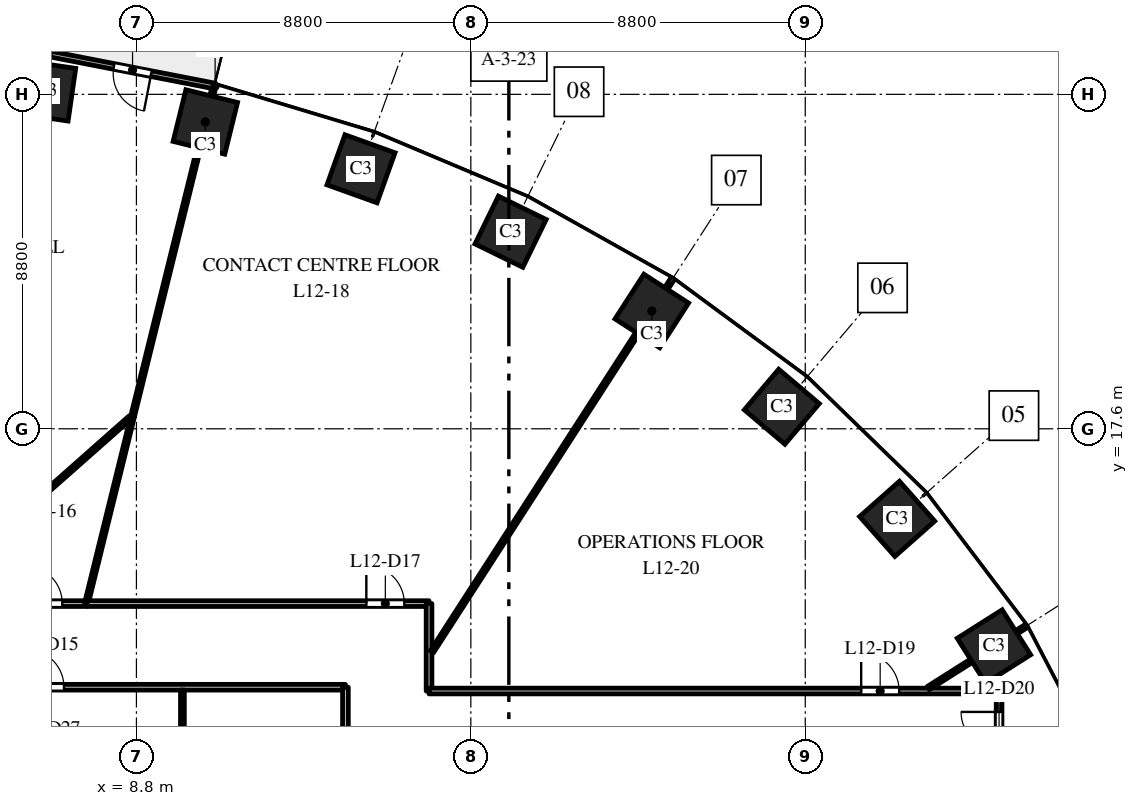
"""IFC4 building model, lengths in metres.
Left out: names, types, materials, properties, quantities, classifications, styles, units other than length and angle.
Written with IfcOpenShell. Run it as: python <this file> out.ifc"""

import sys

from ifc_helpers import new_model, si_unit, direction, frame, frame_2d, origin, origin_2d, place, context, subcontext, project, spatial, rectangle, extrude, element, fill, save


model = new_model("IFC4")
c1 = context("Model", 3, precision=1e-05, world=origin(), true_north=direction((0.0, 1.0)))
c2 = subcontext(c1, "Body", "Model", "MODEL_VIEW")
j1 = project(units=[si_unit("LENGTHUNIT", "METRE"), si_unit("PLANEANGLEUNIT", "RADIAN")], contexts=[c1])
p1 = place(None, origin())
s1 = spatial("IfcSite", under=j1, at=p1, CompositionType="ELEMENT")
p2 = place(p1, origin())
s2 = spatial("IfcBuilding", under=s1, at=p2, CompositionType="ELEMENT")
p3 = place(p2, frame((0.0, 0.0, 58.5)))
s3 = spatial("IfcBuildingStorey", under=s2, at=p3, CompositionType="ELEMENT", Elevation=58.5)
for number, where, z_axis, x_axis in (
    (1, (31.365, 11.871, 0.0), (0.0, 0.0, 1.0), (-0.535, 0.845, 0.0)),
    (2, (28.819, 15.23, 0.0), (0.0, 0.0, 1.0), (-0.663, 0.749, 0.0)),
    (3, (25.783, 18.18, 0.0), (0.0, 0.0, 1.0), (-0.763, 0.646, 0.0)),
    (4, (22.362, 20.7, 0.0), (0.0, 0.0, 1.0), (-0.84, 0.542, 0.0)),
    (5, (18.646, 22.785, 0.0), (0.0, 0.0, 1.0), (-0.898, 0.439, 0.0)),
    (6, (14.709, 24.441, 0.0), (0.0, 0.0, 1.0), (-0.941, 0.338, 0.0)),
    (7, (10.613, 25.674, 0.0), (0.0, 0.0, 1.0), (-0.971, 0.24, 0.0)),
    (8, (6.409, 26.491, 0.0), (0.0, 0.0, 1.0), (-0.99, 0.143, 0.0)),
):
    element("IfcColumn", number, at=place(p3, frame(where, z_axis=z_axis, x_axis=x_axis)), inside=s3, PredefinedType="COLUMN", context=c2, shape_type="SweptSolid", body=[
        extrude(rectangle(XDim=1.4, YDim=1.4, at=origin_2d()), origin(), (0.0, 0.0, 1.0), 4.0),
    ])
p4 = place(p3, frame((10.871, 26.617, 0.0), z_axis=(0.0, 0.0, 1.0), x_axis=(-0.981631174778, 0.190788460615, 0.0)))
e9 = element("IfcWall", 9, at=p4, inside=s3, PredefinedType="STANDARD", context=c2, shape_type="SweptSolid", body=[
    extrude(rectangle(XDim=4.426, YDim=0.15, at=frame_2d((2.213, 0.0))), origin(), (0.0, 0.0, 1.0), 3.7),
])
p5 = place(p4, frame((1.713, 0.0, 0.0)))
e10 = element("IfcOpeningElement", 10, at=p5, cuts=e9, PredefinedType="OPENING", context=c2, shape_type="SweptSolid", body=[
    extrude(rectangle(XDim=1.0, YDim=2.4, at=frame_2d((0.5, 1.2))), frame((0.0, 0.085, 0.0), z_axis=(0.0, -1.0, 0.0), x_axis=(1.0, 0.0, 0.0)), (0.0, 0.0, 1.0), 0.17),
])
p6 = place(p3, frame((-14.3, 10.8, 0.0), z_axis=(0.0, 0.0, 1.0), x_axis=(1.0, 0.0, 0.0)))
e11 = element("IfcWall", 11, at=p6, inside=s3, PredefinedType="PARTITIONING", context=c2, shape_type="SweptSolid", body=[
    extrude(rectangle(XDim=28.6, YDim=0.15, at=frame_2d((14.3, 0.0))), origin(), (0.0, 0.0, 1.0), 2.85),
])
p7 = place(p6, frame((13.16, 0.0, 0.0)))
e12 = element("IfcOpeningElement", 12, at=p7, cuts=e11, PredefinedType="OPENING", context=c2, shape_type="SweptSolid", body=[
    extrude(rectangle(XDim=1.0, YDim=2.1, at=frame_2d((0.5, 1.05))), frame((0.0, 0.085, 0.0), z_axis=(0.0, -1.0, 0.0), x_axis=(1.0, 0.0, 0.0)), (0.0, 0.0, 1.0), 0.17),
])
p8 = place(p6, frame((17.927, 0.0, 0.0)))
e13 = element("IfcOpeningElement", 13, at=p8, cuts=e11, PredefinedType="OPENING", context=c2, shape_type="SweptSolid", body=[
    extrude(rectangle(XDim=1.0, YDim=2.1, at=frame_2d((0.5, 1.05))), frame((0.0, 0.085, 0.0), z_axis=(0.0, -1.0, 0.0), x_axis=(1.0, 0.0, 0.0)), (0.0, 0.0, 1.0), 0.17),
])
p9 = place(p6, frame((20.193, 0.0, 0.0)))
e14 = element("IfcOpeningElement", 14, at=p9, cuts=e11, PredefinedType="OPENING", context=c2, shape_type="SweptSolid", body=[
    extrude(rectangle(XDim=1.0, YDim=2.1, at=frame_2d((0.5, 1.05))), frame((0.0, 0.085, 0.0), z_axis=(0.0, -1.0, 0.0), x_axis=(1.0, 0.0, 0.0)), (0.0, 0.0, 1.0), 0.17),
])
p10 = place(p3, frame((1.233, 13.0, 0.0), z_axis=(0.0, 0.0, 1.0), x_axis=(1.0, 0.0, 0.0)))
e15 = element("IfcWall", 15, at=p10, inside=s3, PredefinedType="PARTITIONING", context=c2, shape_type="SweptSolid", body=[
    extrude(rectangle(XDim=6.25, YDim=0.15, at=frame_2d((3.125, 0.0))), origin(), (0.0, 0.0, 1.0), 2.85),
])
p11 = place(p10, frame((0.471, 0.0, 0.0)))
e16 = element("IfcOpeningElement", 16, at=p11, cuts=e15, PredefinedType="OPENING", context=c2, shape_type="SweptSolid", body=[
    extrude(rectangle(XDim=1.0, YDim=2.1, at=frame_2d((0.5, 1.05))), frame((0.0, 0.085, 0.0), z_axis=(0.0, -1.0, 0.0), x_axis=(1.0, 0.0, 0.0)), (0.0, 0.0, 1.0), 0.17),
])
p12 = place(p10, frame((4.616, 0.0, 0.0)))
e17 = element("IfcOpeningElement", 17, at=p12, cuts=e15, PredefinedType="OPENING", context=c2, shape_type="SweptSolid", body=[
    extrude(rectangle(XDim=1.0, YDim=2.1, at=frame_2d((0.5, 1.05))), frame((0.0, 0.085, 0.0), z_axis=(0.0, -1.0, 0.0), x_axis=(1.0, 0.0, 0.0)), (0.0, 0.0, 1.0), 0.17),
])
p13 = place(p3, frame((3.187, 13.078, 0.0), z_axis=(0.0, 0.0, 1.0), x_axis=(0.749027274438, 0.662539162728, 0.0)))
e18 = element("IfcWall", 18, at=p13, inside=s3, PredefinedType="PARTITIONING", context=c2, shape_type="SweptSolid", body=[
    extrude(rectangle(XDim=7.283, YDim=0.1, at=frame_2d((3.642, 0.0))), origin(), (0.0, 0.0, 1.0), 2.85),
])
p14 = place(p3, frame((7.483, 13.0, 0.0), z_axis=(0.0, 0.0, 1.0), x_axis=(0.239763745499, 0.97083126564, 0.0)))
e19 = element("IfcWall", 19, at=p14, inside=s3, PredefinedType="PARTITIONING", context=c2, shape_type="SweptSolid", body=[
    extrude(rectangle(XDim=14.056, YDim=0.1, at=frame_2d((7.028, 0.0))), origin(), (0.0, 0.0, 1.0), 2.85),
])
p15 = place(p3, frame((7.499, 13.0, 0.0), z_axis=(0.0, 0.0, 1.0), x_axis=(1.0, 0.0, 0.0)))
e20 = element("IfcWall", 20, at=p15, inside=s3, PredefinedType="PARTITIONING", context=c2, shape_type="SweptSolid", body=[
    extrude(rectangle(XDim=9.001, YDim=0.15, at=frame_2d((4.5, 0.0))), origin(), (0.0, 0.0, 1.0), 2.85),
])
p16 = place(p15, frame((7.351, 0.0, 0.0)))
e21 = element("IfcOpeningElement", 21, at=p16, cuts=e20, PredefinedType="OPENING", context=c2, shape_type="SweptSolid", body=[
    extrude(rectangle(XDim=1.0, YDim=2.1, at=frame_2d((0.5, 1.05))), frame((0.0, 0.085, 0.0), z_axis=(0.0, -1.0, 0.0), x_axis=(1.0, 0.0, 0.0)), (0.0, 0.0, 1.0), 0.17),
])
p17 = place(p3, frame((10.01, -10.725, 0.0), z_axis=(0.0, 0.0, 1.0), x_axis=(0.0, 1.0, 0.0)))
e22 = element("IfcWall", 22, at=p17, inside=s3, PredefinedType="PARTITIONING", context=c2, shape_type="SweptSolid", body=[
    extrude(rectangle(XDim=21.45, YDim=0.1, at=frame_2d((10.725, 0.0))), origin(), (0.0, 0.0, 1.0), 2.75),
])
p18 = place(p3, frame((14.3, -10.8, 0.0), z_axis=(0.0, 0.0, 1.0), x_axis=(0.0, 1.0, 0.0)))
e23 = element("IfcWall", 23, at=p18, inside=s3, PredefinedType="PARTITIONING", context=c2, shape_type="SweptSolid", body=[
    extrude(rectangle(XDim=21.6, YDim=0.15, at=frame_2d((10.8, 0.0))), origin(), (0.0, 0.0, 1.0), 2.75),
])
p19 = place(p18, frame((0.7, 0.0, 0.0)))
e24 = element("IfcOpeningElement", 24, at=p19, cuts=e23, PredefinedType="OPENING", context=c2, shape_type="SweptSolid", body=[
    extrude(rectangle(XDim=1.0, YDim=2.1, at=frame_2d((0.5, 1.05))), frame((0.0, 0.085, 0.0), z_axis=(0.0, -1.0, 0.0), x_axis=(1.0, 0.0, 0.0)), (0.0, 0.0, 1.0), 0.17),
])
p20 = place(p3, frame((16.5, 10.7, 0.0), z_axis=(0.0, 0.0, 1.0), x_axis=(0.0, 1.0, 0.0)))
e25 = element("IfcWall", 25, at=p20, inside=s3, PredefinedType="PARTITIONING", context=c2, shape_type="SweptSolid", body=[
    extrude(rectangle(XDim=2.3, YDim=0.15, at=frame_2d((1.15, 0.0))), origin(), (0.0, 0.0, 1.0), 3.7),
])
p21 = place(p3, frame((16.5, 10.7, 0.0), z_axis=(0.0, 0.0, 1.0), x_axis=(1.0, 0.0, 0.0)))
e26 = element("IfcWall", 26, at=p21, inside=s3, PredefinedType="PARTITIONING", context=c2, shape_type="SweptSolid", body=[
    extrude(rectangle(XDim=15.0, YDim=0.15, at=frame_2d((7.5, 0.0))), origin(), (0.0, 0.0, 1.0), 2.75),
])
p22 = place(p21, frame((11.371, 0.0, 0.0)))
e27 = element("IfcOpeningElement", 27, at=p22, cuts=e26, PredefinedType="OPENING", context=c2, shape_type="SweptSolid", body=[
    extrude(rectangle(XDim=1.0, YDim=2.1, at=frame_2d((0.5, 1.05))), frame((0.0, 0.085, 0.0), z_axis=(0.0, -1.0, 0.0), x_axis=(1.0, 0.0, 0.0)), (0.0, 0.0, 1.0), 0.17),
])
p23 = place(p3, frame((16.575, 11.733, 0.0), z_axis=(0.0, 0.0, 1.0), x_axis=(0.54222594427, 0.840232720953, 0.0)))
e28 = element("IfcWall", 28, at=p23, inside=s3, PredefinedType="PARTITIONING", context=c2, shape_type="SweptSolid", body=[
    extrude(rectangle(XDim=11.674, YDim=0.1, at=frame_2d((5.837, 0.0))), origin(), (0.0, 0.0, 1.0), 3.7),
])
p24 = place(p3, frame((29.637, 10.777, 0.0), z_axis=(0.0, 0.0, 1.0), x_axis=(0.844810627195, 0.535065420467, 0.0)))
e29 = element("IfcWall", 29, at=p24, inside=s3, PredefinedType="PARTITIONING", context=c2, shape_type="SweptSolid", body=[
    extrude(rectangle(XDim=3.048, YDim=0.1, at=frame_2d((1.524, 0.0))), origin(), (0.0, 0.0, 1.0), 2.85),
])
p25 = place(p3, frame((31.5, 8.5, 0.0), z_axis=(0.0, 0.0, 1.0), x_axis=(0.0, 1.0, 0.0)))
e30 = element("IfcWall", 30, at=p25, inside=s3, PredefinedType="PARTITIONING", context=c2, shape_type="SweptSolid", body=[
    extrude(rectangle(XDim=2.2, YDim=0.15, at=frame_2d((1.1, 0.0))), origin(), (0.0, 0.0, 1.0), 2.85),
])
p26 = place(p25, frame((0.65, 0.0, 0.0)))
e31 = element("IfcOpeningElement", 31, at=p26, cuts=e30, PredefinedType="OPENING", context=c2, shape_type="SweptSolid", body=[
    extrude(rectangle(XDim=1.0, YDim=2.1, at=frame_2d((0.5, 1.05))), frame((0.0, 0.085, 0.0), z_axis=(0.0, -1.0, 0.0), x_axis=(1.0, 0.0, 0.0)), (0.0, 0.0, 1.0), 0.17),
])
p27 = place(p5, origin())
e32 = element("IfcDoor", 32, at=p27, inside=s3, OperationType="SINGLE_SWING_LEFT", PredefinedType="DOOR", context=c2, shape_type="SweptSolid", body=[
    extrude(rectangle(XDim=1.0, YDim=2.4, at=frame_2d((0.5, 1.2))), frame((0.0, 0.025, 0.0), z_axis=(0.0, -1.0, 0.0), x_axis=(1.0, 0.0, 0.0)), (0.0, 0.0, 1.0), 0.05),
])
fill(e10, e32)
p28 = place(p12, origin())
e33 = element("IfcDoor", 33, at=p28, inside=s3, OperationType="SINGLE_SWING_LEFT", PredefinedType="DOOR", context=c2, shape_type="SweptSolid", body=[
    extrude(rectangle(XDim=1.0, YDim=2.1, at=frame_2d((0.5, 1.05))), frame((0.0, 0.025, 0.0), z_axis=(0.0, -1.0, 0.0), x_axis=(1.0, 0.0, 0.0)), (0.0, 0.0, 1.0), 0.05),
])
fill(e17, e33)
p29 = place(p16, origin())
e34 = element("IfcDoor", 34, at=p29, inside=s3, OperationType="SINGLE_SWING_LEFT", PredefinedType="DOOR", context=c2, shape_type="SweptSolid", body=[
    extrude(rectangle(XDim=1.0, YDim=2.1, at=frame_2d((0.5, 1.05))), frame((0.0, 0.025, 0.0), z_axis=(0.0, -1.0, 0.0), x_axis=(1.0, 0.0, 0.0)), (0.0, 0.0, 1.0), 0.05),
])
fill(e21, e34)
p30 = place(p22, origin())
e35 = element("IfcDoor", 35, at=p30, inside=s3, OperationType="SINGLE_SWING_LEFT", PredefinedType="DOOR", context=c2, shape_type="SweptSolid", body=[
    extrude(rectangle(XDim=1.0, YDim=2.1, at=frame_2d((0.5, 1.05))), frame((0.0, 0.025, 0.0), z_axis=(0.0, -1.0, 0.0), x_axis=(1.0, 0.0, 0.0)), (0.0, 0.0, 1.0), 0.05),
])
fill(e27, e35)
p31 = place(p26, origin())
e36 = element("IfcDoor", 36, at=p31, inside=s3, OperationType="SINGLE_SWING_RIGHT", PredefinedType="DOOR", context=c2, shape_type="SweptSolid", body=[
    extrude(rectangle(XDim=1.0, YDim=2.1, at=frame_2d((0.5, 1.05))), frame((0.0, 0.025, 0.0), z_axis=(0.0, -1.0, 0.0), x_axis=(1.0, 0.0, 0.0)), (0.0, 0.0, 1.0), 0.05),
])
fill(e31, e36)
p32 = place(p9, origin())
e37 = element("IfcDoor", 37, at=p32, inside=s3, OperationType="SINGLE_SWING_LEFT", PredefinedType="DOOR", context=c2, shape_type="SweptSolid", body=[
    extrude(rectangle(XDim=1.0, YDim=2.1, at=frame_2d((0.5, 1.05))), frame((0.0, 0.025, 0.0), z_axis=(0.0, -1.0, 0.0), x_axis=(1.0, 0.0, 0.0)), (0.0, 0.0, 1.0), 0.05),
])
fill(e14, e37)
save(model, sys.argv[1])
